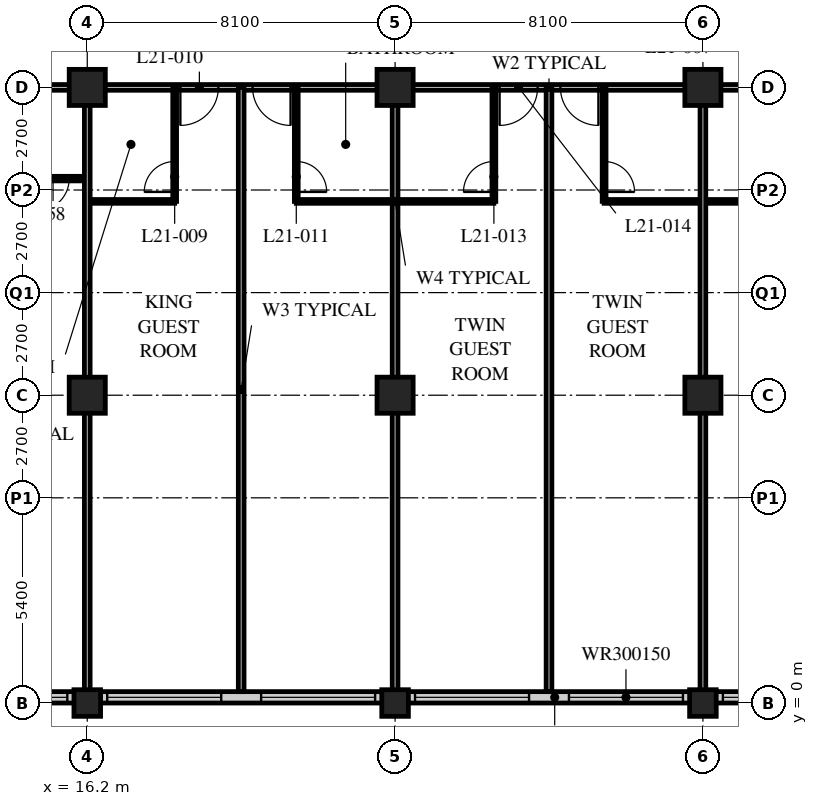
"""IFC4 building model, lengths in metres.
Left out: names, types, materials, properties, quantities, classifications, styles, units other than length and angle.
Written with IfcOpenShell. Run it as: python <this file> out.ifc"""

import sys

from ifc_helpers import new_model, si_unit, direction, frame, frame_2d, origin, origin_2d, place, context, subcontext, project, spatial, rectangle, hollow_rectangle, extrude, element, fill, save


model = new_model("IFC4")
c1 = context("Model", 3, precision=1e-05, world=origin(), true_north=direction((0.0, 1.0)))
c2 = subcontext(c1, "Body", "Model", "MODEL_VIEW")
j1 = project(units=[si_unit("LENGTHUNIT", "METRE"), si_unit("PLANEANGLEUNIT", "RADIAN")], contexts=[c1])
p1 = place(None, origin())
s1 = spatial("IfcSite", under=j1, at=p1, CompositionType="ELEMENT")
p2 = place(p1, origin())
s2 = spatial("IfcBuilding", under=s1, at=p2, CompositionType="ELEMENT")
p3 = place(p2, frame((0.0, 0.0, 84.0)))
s3 = spatial("IfcBuildingStorey", under=s2, at=p3, CompositionType="ELEMENT", Elevation=84.0)
p4 = place(p3, frame((16.2, 0.0, 0.0), z_axis=(0.0, 0.0, 1.0), x_axis=(1.0, 0.0, 0.0)))
e1 = element("IfcColumn", 1, at=p4, inside=s3, PredefinedType="COLUMN", context=c2, shape_type="SweptSolid", body=[
    extrude(hollow_rectangle(XDim=0.7, YDim=0.7, WallThickness=0.06, at=origin_2d()), origin(), (0.0, 0.0, 1.0), 3.4),
])
for number, where, z_axis, x_axis in (
    (2, (16.2, 8.1, 0.0), (0.0, 0.0, 1.0), (1.0, 0.0, 0.0)),
    (3, (16.2, 16.2, 0.0), (0.0, 0.0, 1.0), (1.0, 0.0, 0.0)),
):
    element("IfcColumn", number, at=place(p3, frame(where, z_axis=z_axis, x_axis=x_axis)), inside=s3, PredefinedType="COLUMN", context=c2, shape_type="SweptSolid", body=[
        extrude(hollow_rectangle(XDim=0.95, YDim=0.95, WallThickness=0.095, at=origin_2d()), origin(), (0.0, 0.0, 1.0), 3.4),
    ])
p5 = place(p3, frame((24.3, 0.0, 0.0), z_axis=(0.0, 0.0, 1.0), x_axis=(1.0, 0.0, 0.0)))
e4 = element("IfcColumn", 4, at=p5, inside=s3, PredefinedType="COLUMN", context=c2, shape_type="SweptSolid", body=[
    extrude(hollow_rectangle(XDim=0.7, YDim=0.7, WallThickness=0.06, at=origin_2d()), origin(), (0.0, 0.0, 1.0), 3.4),
])
for number, where, z_axis, x_axis in (
    (5, (24.3, 8.1, 0.0), (0.0, 0.0, 1.0), (1.0, 0.0, 0.0)),
    (6, (24.3, 16.2, 0.0), (0.0, 0.0, 1.0), (1.0, 0.0, 0.0)),
):
    element("IfcColumn", number, at=place(p3, frame(where, z_axis=z_axis, x_axis=x_axis)), inside=s3, PredefinedType="COLUMN", context=c2, shape_type="SweptSolid", body=[
        extrude(hollow_rectangle(XDim=0.95, YDim=0.95, WallThickness=0.095, at=origin_2d()), origin(), (0.0, 0.0, 1.0), 3.4),
    ])
p6 = place(p3, frame((32.4, 0.0, 0.0), z_axis=(0.0, 0.0, 1.0), x_axis=(1.0, 0.0, 0.0)))
e7 = element("IfcColumn", 7, at=p6, inside=s3, PredefinedType="COLUMN", context=c2, shape_type="SweptSolid", body=[
    extrude(hollow_rectangle(XDim=0.7, YDim=0.7, WallThickness=0.06, at=origin_2d()), origin(), (0.0, 0.0, 1.0), 3.4),
])
for number, where, z_axis, x_axis in (
    (8, (32.4, 8.1, 0.0), (0.0, 0.0, 1.0), (1.0, 0.0, 0.0)),
    (9, (32.4, 16.2, 0.0), (0.0, 0.0, 1.0), (1.0, 0.0, 0.0)),
):
    element("IfcColumn", number, at=place(p3, frame(where, z_axis=z_axis, x_axis=x_axis)), inside=s3, PredefinedType="COLUMN", context=c2, shape_type="SweptSolid", body=[
        extrude(hollow_rectangle(XDim=0.95, YDim=0.95, WallThickness=0.095, at=origin_2d()), origin(), (0.0, 0.0, 1.0), 3.4),
    ])
p7 = place(p3, frame((8.4, 0.15, 0.0), z_axis=(0.0, 0.0, 1.0), x_axis=(1.0, 0.0, 0.0)))
e10 = element("IfcWall", 10, at=p7, inside=s3, PredefinedType="SOLIDWALL", context=c2, shape_type="SweptSolid", body=[
    extrude(rectangle(XDim=40.2, YDim=0.3, at=frame_2d((20.1, 0.0))), origin(), (0.0, 0.0, 1.0), 3.19),
])
p8 = place(p7, frame((0.225, 0.0, 0.9)))
e11 = element("IfcOpeningElement", 11, at=p8, cuts=e10, PredefinedType="OPENING", context=c2, shape_type="SweptSolid", body=[
    extrude(rectangle(XDim=3.0, YDim=1.5, at=frame_2d((1.5, 0.75))), frame((0.0, 0.16, 0.0), z_axis=(0.0, -1.0, 0.0), x_axis=(1.0, 0.0, 0.0)), (0.0, 0.0, 1.0), 0.32),
])
p9 = place(p7, frame((4.275, 0.0, 0.9)))
e12 = element("IfcOpeningElement", 12, at=p9, cuts=e10, PredefinedType="OPENING", context=c2, shape_type="SweptSolid", body=[
    extrude(rectangle(XDim=3.0, YDim=1.5, at=frame_2d((1.5, 0.75))), frame((0.0, 0.16, 0.0), z_axis=(0.0, -1.0, 0.0), x_axis=(1.0, 0.0, 0.0)), (0.0, 0.0, 1.0), 0.32),
])
p10 = place(p7, frame((8.325, 0.0, 0.9)))
e13 = element("IfcOpeningElement", 13, at=p10, cuts=e10, PredefinedType="OPENING", context=c2, shape_type="SweptSolid", body=[
    extrude(rectangle(XDim=3.0, YDim=1.5, at=frame_2d((1.5, 0.75))), frame((0.0, 0.16, 0.0), z_axis=(0.0, -1.0, 0.0), x_axis=(1.0, 0.0, 0.0)), (0.0, 0.0, 1.0), 0.32),
])
p11 = place(p7, frame((12.375, 0.0, 0.9)))
e14 = element("IfcOpeningElement", 14, at=p11, cuts=e10, PredefinedType="OPENING", context=c2, shape_type="SweptSolid", body=[
    extrude(rectangle(XDim=3.0, YDim=1.5, at=frame_2d((1.5, 0.75))), frame((0.0, 0.16, 0.0), z_axis=(0.0, -1.0, 0.0), x_axis=(1.0, 0.0, 0.0)), (0.0, 0.0, 1.0), 0.32),
])
p12 = place(p7, frame((16.425, 0.0, 0.9)))
e15 = element("IfcOpeningElement", 15, at=p12, cuts=e10, PredefinedType="OPENING", context=c2, shape_type="SweptSolid", body=[
    extrude(rectangle(XDim=3.0, YDim=1.5, at=frame_2d((1.5, 0.75))), frame((0.0, 0.16, 0.0), z_axis=(0.0, -1.0, 0.0), x_axis=(1.0, 0.0, 0.0)), (0.0, 0.0, 1.0), 0.32),
])
p13 = place(p7, frame((20.475, 0.0, 0.9)))
e16 = element("IfcOpeningElement", 16, at=p13, cuts=e10, PredefinedType="OPENING", context=c2, shape_type="SweptSolid", body=[
    extrude(rectangle(XDim=3.0, YDim=1.5, at=frame_2d((1.5, 0.75))), frame((0.0, 0.16, 0.0), z_axis=(0.0, -1.0, 0.0), x_axis=(1.0, 0.0, 0.0)), (0.0, 0.0, 1.0), 0.32),
])
p14 = place(p7, frame((24.525, 0.0, 0.9)))
e17 = element("IfcOpeningElement", 17, at=p14, cuts=e10, PredefinedType="OPENING", context=c2, shape_type="SweptSolid", body=[
    extrude(rectangle(XDim=3.0, YDim=1.5, at=frame_2d((1.5, 0.75))), frame((0.0, 0.16, 0.0), z_axis=(0.0, -1.0, 0.0), x_axis=(1.0, 0.0, 0.0)), (0.0, 0.0, 1.0), 0.32),
])
p15 = place(p7, frame((28.575, 0.0, 0.9)))
e18 = element("IfcOpeningElement", 18, at=p15, cuts=e10, PredefinedType="OPENING", context=c2, shape_type="SweptSolid", body=[
    extrude(rectangle(XDim=3.0, YDim=1.5, at=frame_2d((1.5, 0.75))), frame((0.0, 0.16, 0.0), z_axis=(0.0, -1.0, 0.0), x_axis=(1.0, 0.0, 0.0)), (0.0, 0.0, 1.0), 0.32),
])
p16 = place(p7, frame((32.625, 0.0, 0.9)))
e19 = element("IfcOpeningElement", 19, at=p16, cuts=e10, PredefinedType="OPENING", context=c2, shape_type="SweptSolid", body=[
    extrude(rectangle(XDim=3.0, YDim=1.5, at=frame_2d((1.5, 0.75))), frame((0.0, 0.16, 0.0), z_axis=(0.0, -1.0, 0.0), x_axis=(1.0, 0.0, 0.0)), (0.0, 0.0, 1.0), 0.32),
])
p17 = place(p7, frame((36.675, 0.0, 0.9)))
e20 = element("IfcOpeningElement", 20, at=p17, cuts=e10, PredefinedType="OPENING", context=c2, shape_type="SweptSolid", body=[
    extrude(rectangle(XDim=3.0, YDim=1.5, at=frame_2d((1.5, 0.75))), frame((0.0, 0.16, 0.0), z_axis=(0.0, -1.0, 0.0), x_axis=(1.0, 0.0, 0.0)), (0.0, 0.0, 1.0), 0.32),
])
p18 = place(p3, frame((12.15, 16.2, 0.0), z_axis=(0.0, 0.0, 1.0), x_axis=(1.0, 0.0, 0.0)))
e21 = element("IfcWall", 21, at=p18, inside=s3, PredefinedType="PARTITIONING", context=c2, shape_type="SweptSolid", body=[
    extrude(rectangle(XDim=32.4, YDim=0.15, at=frame_2d((16.2, 0.0))), origin(), (0.0, 0.0, 1.0), 2.428),
])
p19 = place(p18, frame((6.5, 0.0, 0.0)))
e22 = element("IfcOpeningElement", 22, at=p19, cuts=e21, PredefinedType="OPENING", context=c2, shape_type="SweptSolid", body=[
    extrude(rectangle(XDim=1.0, YDim=2.1, at=frame_2d((0.5, 1.05))), frame((0.0, 0.085, 0.0), z_axis=(0.0, -1.0, 0.0), x_axis=(1.0, 0.0, 0.0)), (0.0, 0.0, 1.0), 0.17),
])
p20 = place(p18, frame((8.4, 0.0, 0.0)))
e23 = element("IfcOpeningElement", 23, at=p20, cuts=e21, PredefinedType="OPENING", context=c2, shape_type="SweptSolid", body=[
    extrude(rectangle(XDim=1.0, YDim=2.1, at=frame_2d((0.5, 1.05))), frame((0.0, 0.085, 0.0), z_axis=(0.0, -1.0, 0.0), x_axis=(1.0, 0.0, 0.0)), (0.0, 0.0, 1.0), 0.17),
])
p21 = place(p18, frame((14.9, 0.0, 0.0)))
e24 = element("IfcOpeningElement", 24, at=p21, cuts=e21, PredefinedType="OPENING", context=c2, shape_type="SweptSolid", body=[
    extrude(rectangle(XDim=1.0, YDim=2.1, at=frame_2d((0.5, 1.05))), frame((0.0, 0.085, 0.0), z_axis=(0.0, -1.0, 0.0), x_axis=(1.0, 0.0, 0.0)), (0.0, 0.0, 1.0), 0.17),
])
p22 = place(p18, frame((16.5, 0.0, 0.0)))
e25 = element("IfcOpeningElement", 25, at=p22, cuts=e21, PredefinedType="OPENING", context=c2, shape_type="SweptSolid", body=[
    extrude(rectangle(XDim=1.0, YDim=2.1, at=frame_2d((0.5, 1.05))), frame((0.0, 0.085, 0.0), z_axis=(0.0, -1.0, 0.0), x_axis=(1.0, 0.0, 0.0)), (0.0, 0.0, 1.0), 0.17),
])
p23 = place(p18, frame((23.0, 0.0, 0.0)))
e26 = element("IfcOpeningElement", 26, at=p23, cuts=e21, PredefinedType="OPENING", context=c2, shape_type="SweptSolid", body=[
    extrude(rectangle(XDim=1.0, YDim=2.1, at=frame_2d((0.5, 1.05))), frame((0.0, 0.085, 0.0), z_axis=(0.0, -1.0, 0.0), x_axis=(1.0, 0.0, 0.0)), (0.0, 0.0, 1.0), 0.17),
])
p24 = place(p18, frame((24.9, 0.0, 0.0)))
e27 = element("IfcOpeningElement", 27, at=p24, cuts=e21, PredefinedType="OPENING", context=c2, shape_type="SweptSolid", body=[
    extrude(rectangle(XDim=1.0, YDim=2.1, at=frame_2d((0.5, 1.05))), frame((0.0, 0.085, 0.0), z_axis=(0.0, -1.0, 0.0), x_axis=(1.0, 0.0, 0.0)), (0.0, 0.0, 1.0), 0.17),
])
p25 = place(p18, frame((1.525, 0.0, 0.0)))
e28 = element("IfcOpeningElement", 28, at=p25, cuts=e21, PredefinedType="OPENING", context=c2, shape_type="SweptSolid", body=[
    extrude(rectangle(XDim=1.0, YDim=2.1, at=frame_2d((0.5, 1.05))), frame((0.0, 0.085, 0.0), z_axis=(0.0, -1.0, 0.0), x_axis=(1.0, 0.0, 0.0)), (0.0, 0.0, 1.0), 0.17),
])
p26 = place(p18, frame((29.875, 0.0, 0.0)))
e29 = element("IfcOpeningElement", 29, at=p26, cuts=e21, PredefinedType="OPENING", context=c2, shape_type="SweptSolid", body=[
    extrude(rectangle(XDim=1.0, YDim=2.1, at=frame_2d((0.5, 1.05))), frame((0.0, 0.085, 0.0), z_axis=(0.0, -1.0, 0.0), x_axis=(1.0, 0.0, 0.0)), (0.0, 0.0, 1.0), 0.17),
])
p27 = place(p3, frame((16.2, 13.2, 0.0), z_axis=(0.0, 0.0, 1.0), x_axis=(1.0, 0.0, 0.0)))
e30 = element("IfcWall", 30, at=p27, inside=s3, PredefinedType="PARTITIONING", context=c2, shape_type="SweptSolid", body=[
    extrude(rectangle(XDim=2.3, YDim=0.1, at=frame_2d((1.15, 0.0))), origin(), (0.0, 0.0, 1.0), 3.19),
])
p28 = place(p3, frame((18.5, 16.2, 0.0), z_axis=(0.0, 0.0, 1.0), x_axis=(0.0, -1.0, 0.0)))
e31 = element("IfcWall", 31, at=p28, inside=s3, PredefinedType="PARTITIONING", context=c2, shape_type="SweptSolid", body=[
    extrude(rectangle(XDim=3.0, YDim=0.1, at=frame_2d((1.5, 0.0))), origin(), (0.0, 0.0, 1.0), 3.19),
])
p29 = place(p28, frame((1.95, 0.0, 0.0)))
e32 = element("IfcOpeningElement", 32, at=p29, cuts=e31, PredefinedType="OPENING", context=c2, shape_type="SweptSolid", body=[
    extrude(rectangle(XDim=0.8, YDim=2.1, at=frame_2d((0.4, 1.05))), frame((0.0, 0.06, 0.0), z_axis=(0.0, -1.0, 0.0), x_axis=(1.0, 0.0, 0.0)), (0.0, 0.0, 1.0), 0.12),
])
p30 = place(p3, frame((20.25, 16.2, 0.0), z_axis=(0.0, 0.0, 1.0), x_axis=(0.0, -1.0, 0.0)))
e33 = element("IfcWall", 33, at=p30, inside=s3, PredefinedType="PARTITIONING", context=c2, shape_type="SweptSolid", body=[
    extrude(rectangle(XDim=15.9, YDim=0.15, at=frame_2d((7.95, 0.0))), origin(), (0.0, 0.0, 1.0), 3.19),
])
p31 = place(p3, frame((21.7, 13.2, 0.0), z_axis=(0.0, 0.0, 1.0), x_axis=(1.0, 0.0, 0.0)))
e34 = element("IfcWall", 34, at=p31, inside=s3, PredefinedType="PARTITIONING", context=c2, shape_type="SweptSolid", body=[
    extrude(rectangle(XDim=5.2, YDim=0.1, at=frame_2d((2.6, 0.0))), origin(), (0.0, 0.0, 1.0), 3.19),
])
p32 = place(p3, frame((21.7, 16.2, 0.0), z_axis=(0.0, 0.0, 1.0), x_axis=(0.0, -1.0, 0.0)))
e35 = element("IfcWall", 35, at=p32, inside=s3, PredefinedType="PARTITIONING", context=c2, shape_type="SweptSolid", body=[
    extrude(rectangle(XDim=3.0, YDim=0.1, at=frame_2d((1.5, 0.0))), origin(), (0.0, 0.0, 1.0), 3.19),
])
p33 = place(p32, frame((1.95, 0.0, 0.0)))
e36 = element("IfcOpeningElement", 36, at=p33, cuts=e35, PredefinedType="OPENING", context=c2, shape_type="SweptSolid", body=[
    extrude(rectangle(XDim=0.8, YDim=2.1, at=frame_2d((0.4, 1.05))), frame((0.0, 0.06, 0.0), z_axis=(0.0, -1.0, 0.0), x_axis=(1.0, 0.0, 0.0)), (0.0, 0.0, 1.0), 0.12),
])
p34 = place(p3, frame((24.3, 16.2, 0.0), z_axis=(0.0, 0.0, 1.0), x_axis=(0.0, -1.0, 0.0)))
e37 = element("IfcWall", 37, at=p34, inside=s3, PredefinedType="PARTITIONING", context=c2, shape_type="SweptSolid", body=[
    extrude(rectangle(XDim=15.9, YDim=0.15, at=frame_2d((7.95, 0.0))), origin(), (0.0, 0.0, 1.0), 2.428),
])
p35 = place(p3, frame((26.9, 16.2, 0.0), z_axis=(0.0, 0.0, 1.0), x_axis=(0.0, -1.0, 0.0)))
e38 = element("IfcWall", 38, at=p35, inside=s3, PredefinedType="PARTITIONING", context=c2, shape_type="SweptSolid", body=[
    extrude(rectangle(XDim=3.0, YDim=0.1, at=frame_2d((1.5, 0.0))), origin(), (0.0, 0.0, 1.0), 3.19),
])
p36 = place(p35, frame((1.95, 0.0, 0.0)))
e39 = element("IfcOpeningElement", 39, at=p36, cuts=e38, PredefinedType="OPENING", context=c2, shape_type="SweptSolid", body=[
    extrude(rectangle(XDim=0.8, YDim=2.1, at=frame_2d((0.4, 1.05))), frame((0.0, 0.06, 0.0), z_axis=(0.0, -1.0, 0.0), x_axis=(1.0, 0.0, 0.0)), (0.0, 0.0, 1.0), 0.12),
])
p37 = place(p3, frame((28.35, 16.2, 0.0), z_axis=(0.0, 0.0, 1.0), x_axis=(0.0, -1.0, 0.0)))
e40 = element("IfcWall", 40, at=p37, inside=s3, PredefinedType="PARTITIONING", context=c2, shape_type="SweptSolid", body=[
    extrude(rectangle(XDim=15.9, YDim=0.15, at=frame_2d((7.95, 0.0))), origin(), (0.0, 0.0, 1.0), 3.19),
])
p38 = place(p3, frame((29.8, 13.2, 0.0), z_axis=(0.0, 0.0, 1.0), x_axis=(1.0, 0.0, 0.0)))
e41 = element("IfcWall", 41, at=p38, inside=s3, PredefinedType="PARTITIONING", context=c2, shape_type="SweptSolid", body=[
    extrude(rectangle(XDim=5.2, YDim=0.1, at=frame_2d((2.6, 0.0))), origin(), (0.0, 0.0, 1.0), 3.19),
])
p39 = place(p3, frame((29.8, 16.2, 0.0), z_axis=(0.0, 0.0, 1.0), x_axis=(0.0, -1.0, 0.0)))
e42 = element("IfcWall", 42, at=p39, inside=s3, PredefinedType="PARTITIONING", context=c2, shape_type="SweptSolid", body=[
    extrude(rectangle(XDim=3.0, YDim=0.1, at=frame_2d((1.5, 0.0))), origin(), (0.0, 0.0, 1.0), 3.19),
])
p40 = place(p39, frame((1.95, 0.0, 0.0)))
e43 = element("IfcOpeningElement", 43, at=p40, cuts=e42, PredefinedType="OPENING", context=c2, shape_type="SweptSolid", body=[
    extrude(rectangle(XDim=0.8, YDim=2.1, at=frame_2d((0.4, 1.05))), frame((0.0, 0.06, 0.0), z_axis=(0.0, -1.0, 0.0), x_axis=(1.0, 0.0, 0.0)), (0.0, 0.0, 1.0), 0.12),
])
p41 = place(p3, frame((32.4, 16.2, 0.0), z_axis=(0.0, 0.0, 1.0), x_axis=(0.0, -1.0, 0.0)))
e44 = element("IfcWall", 44, at=p41, inside=s3, PredefinedType="PARTITIONING", context=c2, shape_type="SweptSolid", body=[
    extrude(rectangle(XDim=15.9, YDim=0.15, at=frame_2d((7.95, 0.0))), origin(), (0.0, 0.0, 1.0), 2.428),
])
p42 = place(p3, frame((8.15, 13.8, 0.0), z_axis=(0.0, 0.0, 1.0), x_axis=(1.0, 0.0, 0.0)))
e45 = element("IfcWall", 45, at=p42, inside=s3, PredefinedType="PARTITIONING", context=c2, shape_type="SweptSolid", body=[
    extrude(rectangle(XDim=8.05, YDim=0.12, at=frame_2d((4.025, 0.0))), origin(), (0.0, 0.0, 1.0), 3.19),
])
p43 = place(p42, frame((6.725, 0.0, 0.0)))
e46 = element("IfcOpeningElement", 46, at=p43, cuts=e45, PredefinedType="OPENING", context=c2, shape_type="SweptSolid", body=[
    extrude(rectangle(XDim=0.85, YDim=2.1, at=frame_2d((0.425, 1.05))), frame((0.0, 0.07, 0.0), z_axis=(0.0, -1.0, 0.0), x_axis=(1.0, 0.0, 0.0)), (0.0, 0.0, 1.0), 0.14),
])
p44 = place(p42, frame((2.875, 0.0, 0.0)))
e47 = element("IfcOpeningElement", 47, at=p44, cuts=e45, PredefinedType="OPENING", context=c2, shape_type="SweptSolid", body=[
    extrude(rectangle(XDim=0.85, YDim=2.1, at=frame_2d((0.425, 1.05))), frame((0.0, 0.07, 0.0), z_axis=(0.0, -1.0, 0.0), x_axis=(1.0, 0.0, 0.0)), (0.0, 0.0, 1.0), 0.14),
])
p45 = place(p3, frame((16.2, 16.2, 0.0), z_axis=(0.0, 0.0, 1.0), x_axis=(0.0, -1.0, 0.0)))
e48 = element("IfcWall", 48, at=p45, inside=s3, PredefinedType="PARTITIONING", context=c2, shape_type="SweptSolid", body=[
    extrude(rectangle(XDim=15.9, YDim=0.15, at=frame_2d((7.95, 0.0))), origin(), (0.0, 0.0, 1.0), 2.428),
])
p46 = place(p9, origin())
e49 = element("IfcWindow", 49, at=p46, inside=s3, PartitioningType="SINGLE_PANEL", PredefinedType="WINDOW", context=c2, shape_type="SweptSolid", body=[
    extrude(rectangle(XDim=3.0, YDim=1.5, at=frame_2d((1.5, 0.75))), frame((0.0, 0.03, 0.0), z_axis=(0.0, -1.0, 0.0), x_axis=(1.0, 0.0, 0.0)), (0.0, 0.0, 1.0), 0.06),
])
fill(e12, e49)
p47 = place(p10, origin())
e50 = element("IfcWindow", 50, at=p47, inside=s3, PartitioningType="SINGLE_PANEL", PredefinedType="WINDOW", context=c2, shape_type="SweptSolid", body=[
    extrude(rectangle(XDim=3.0, YDim=1.5, at=frame_2d((1.5, 0.75))), frame((0.0, 0.03, 0.0), z_axis=(0.0, -1.0, 0.0), x_axis=(1.0, 0.0, 0.0)), (0.0, 0.0, 1.0), 0.06),
])
fill(e13, e50)
p48 = place(p11, origin())
e51 = element("IfcWindow", 51, at=p48, inside=s3, PartitioningType="SINGLE_PANEL", PredefinedType="WINDOW", context=c2, shape_type="SweptSolid", body=[
    extrude(rectangle(XDim=3.0, YDim=1.5, at=frame_2d((1.5, 0.75))), frame((0.0, 0.03, 0.0), z_axis=(0.0, -1.0, 0.0), x_axis=(1.0, 0.0, 0.0)), (0.0, 0.0, 1.0), 0.06),
])
fill(e14, e51)
p49 = place(p12, origin())
e52 = element("IfcWindow", 52, at=p49, inside=s3, PartitioningType="SINGLE_PANEL", PredefinedType="WINDOW", context=c2, shape_type="SweptSolid", body=[
    extrude(rectangle(XDim=3.0, YDim=1.5, at=frame_2d((1.5, 0.75))), frame((0.0, 0.03, 0.0), z_axis=(0.0, -1.0, 0.0), x_axis=(1.0, 0.0, 0.0)), (0.0, 0.0, 1.0), 0.06),
])
fill(e15, e52)
p50 = place(p13, origin())
e53 = element("IfcWindow", 53, at=p50, inside=s3, PartitioningType="SINGLE_PANEL", PredefinedType="WINDOW", context=c2, shape_type="SweptSolid", body=[
    extrude(rectangle(XDim=3.0, YDim=1.5, at=frame_2d((1.5, 0.75))), frame((0.0, 0.03, 0.0), z_axis=(0.0, -1.0, 0.0), x_axis=(1.0, 0.0, 0.0)), (0.0, 0.0, 1.0), 0.06),
])
fill(e16, e53)
p51 = place(p14, origin())
e54 = element("IfcWindow", 54, at=p51, inside=s3, PartitioningType="SINGLE_PANEL", PredefinedType="WINDOW", context=c2, shape_type="SweptSolid", body=[
    extrude(rectangle(XDim=3.0, YDim=1.5, at=frame_2d((1.5, 0.75))), frame((0.0, 0.03, 0.0), z_axis=(0.0, -1.0, 0.0), x_axis=(1.0, 0.0, 0.0)), (0.0, 0.0, 1.0), 0.06),
])
fill(e17, e54)
p52 = place(p29, origin())
e55 = element("IfcDoor", 55, at=p52, inside=s3, OperationType="SINGLE_SWING_LEFT", PredefinedType="DOOR", context=c2, shape_type="SweptSolid", body=[
    extrude(rectangle(XDim=0.8, YDim=2.1, at=frame_2d((0.4, 1.05))), frame((0.0, 0.025, 0.0), z_axis=(0.0, -1.0, 0.0), x_axis=(1.0, 0.0, 0.0)), (0.0, 0.0, 1.0), 0.05),
])
fill(e32, e55)
p53 = place(p19, origin())
e56 = element("IfcDoor", 56, at=p53, inside=s3, OperationType="SINGLE_SWING_RIGHT", PredefinedType="DOOR", context=c2, shape_type="SweptSolid", body=[
    extrude(rectangle(XDim=1.0, YDim=2.1, at=frame_2d((0.5, 1.05))), frame((0.0, 0.025, 0.0), z_axis=(0.0, -1.0, 0.0), x_axis=(1.0, 0.0, 0.0)), (0.0, 0.0, 1.0), 0.05),
])
fill(e22, e56)
p54 = place(p33, origin())
e57 = element("IfcDoor", 57, at=p54, inside=s3, OperationType="SINGLE_SWING_RIGHT", PredefinedType="DOOR", context=c2, shape_type="SweptSolid", body=[
    extrude(rectangle(XDim=0.8, YDim=2.1, at=frame_2d((0.4, 1.05))), frame((0.0, 0.025, 0.0), z_axis=(0.0, -1.0, 0.0), x_axis=(1.0, 0.0, 0.0)), (0.0, 0.0, 1.0), 0.05),
])
fill(e36, e57)
p55 = place(p20, origin())
e58 = element("IfcDoor", 58, at=p55, inside=s3, OperationType="SINGLE_SWING_LEFT", PredefinedType="DOOR", context=c2, shape_type="SweptSolid", body=[
    extrude(rectangle(XDim=1.0, YDim=2.1, at=frame_2d((0.5, 1.05))), frame((0.0, 0.025, 0.0), z_axis=(0.0, -1.0, 0.0), x_axis=(1.0, 0.0, 0.0)), (0.0, 0.0, 1.0), 0.05),
])
fill(e23, e58)
p56 = place(p36, origin())
e59 = element("IfcDoor", 59, at=p56, inside=s3, OperationType="SINGLE_SWING_LEFT", PredefinedType="DOOR", context=c2, shape_type="SweptSolid", body=[
    extrude(rectangle(XDim=0.8, YDim=2.1, at=frame_2d((0.4, 1.05))), frame((0.0, 0.025, 0.0), z_axis=(0.0, -1.0, 0.0), x_axis=(1.0, 0.0, 0.0)), (0.0, 0.0, 1.0), 0.05),
])
fill(e39, e59)
p57 = place(p21, origin())
e60 = element("IfcDoor", 60, at=p57, inside=s3, OperationType="SINGLE_SWING_RIGHT", PredefinedType="DOOR", context=c2, shape_type="SweptSolid", body=[
    extrude(rectangle(XDim=1.0, YDim=2.1, at=frame_2d((0.5, 1.05))), frame((0.0, 0.025, 0.0), z_axis=(0.0, -1.0, 0.0), x_axis=(1.0, 0.0, 0.0)), (0.0, 0.0, 1.0), 0.05),
])
fill(e24, e60)
p58 = place(p40, origin())
e61 = element("IfcDoor", 61, at=p58, inside=s3, OperationType="SINGLE_SWING_RIGHT", PredefinedType="DOOR", context=c2, shape_type="SweptSolid", body=[
    extrude(rectangle(XDim=0.8, YDim=2.1, at=frame_2d((0.4, 1.05))), frame((0.0, 0.025, 0.0), z_axis=(0.0, -1.0, 0.0), x_axis=(1.0, 0.0, 0.0)), (0.0, 0.0, 1.0), 0.05),
])
fill(e43, e61)
p59 = place(p22, origin())
e62 = element("IfcDoor", 62, at=p59, inside=s3, OperationType="SINGLE_SWING_LEFT", PredefinedType="DOOR", context=c2, shape_type="SweptSolid", body=[
    extrude(rectangle(XDim=1.0, YDim=2.1, at=frame_2d((0.5, 1.05))), frame((0.0, 0.025, 0.0), z_axis=(0.0, -1.0, 0.0), x_axis=(1.0, 0.0, 0.0)), (0.0, 0.0, 1.0), 0.05),
])
fill(e25, e62)
p60 = place(p43, origin())
e63 = element("IfcDoor", 63, at=p60, inside=s3, OperationType="SINGLE_SWING_RIGHT", PredefinedType="DOOR", context=c2, shape_type="SweptSolid", body=[
    extrude(rectangle(XDim=0.85, YDim=2.1, at=frame_2d((0.425, 1.05))), frame((0.0, 0.025, 0.0), z_axis=(0.0, -1.0, 0.0), x_axis=(1.0, 0.0, 0.0)), (0.0, 0.0, 1.0), 0.05),
])
fill(e46, e63)
save(model, sys.argv[1])
